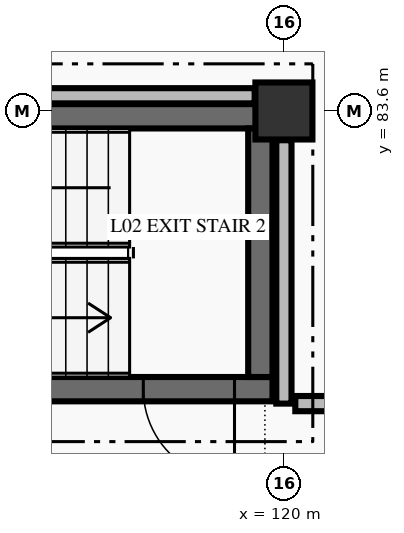
"""IFC4 building model, lengths in metres.
Left out: names, types, materials, properties, quantities, classifications, styles, units other than length and angle.
Written with IfcOpenShell. Run it as: python <this file> out.ifc"""

import sys

from ifc_helpers import new_model, si_unit, direction, frame, frame_2d, origin, origin_2d, place, context, subcontext, project, spatial, rectangle, extrude, element, fill, save


model = new_model("IFC4")
c1 = context("Model", 3, precision=1e-05, world=origin(), true_north=direction((0.0, 1.0)))
c2 = subcontext(c1, "Body", "Model", "MODEL_VIEW")
j1 = project(units=[si_unit("LENGTHUNIT", "METRE"), si_unit("PLANEANGLEUNIT", "RADIAN")], contexts=[c1])
p1 = place(None, origin())
s1 = spatial("IfcSite", under=j1, at=p1, CompositionType="ELEMENT")
p2 = place(p1, origin())
s2 = spatial("IfcBuilding", under=s1, at=p2, CompositionType="ELEMENT")
p3 = place(p2, frame((0.0, 0.0, 5.4)))
s3 = spatial("IfcBuildingStorey", under=s2, at=p3, CompositionType="ELEMENT", Elevation=5.4)
p4 = place(p3, frame((120.0, 83.6, 0.0), z_axis=(0.0, 0.0, 1.0), x_axis=(1.0, 0.0, 0.0)))
e1 = element("IfcColumn", 1, at=p4, inside=s3, PredefinedType="COLUMN", context=c2, shape_type="SweptSolid", body=[
    extrude(rectangle(XDim=0.75, YDim=0.75, at=origin_2d()), origin(), (0.0, 0.0, 1.0), 4.8),
])
p5 = place(p3, frame((119.85, 79.94, 0.0), z_axis=(0.0, 0.0, 1.0), x_axis=(-1.0, 0.0, 0.0)))
e2 = element("IfcWall", 2, at=p5, inside=s3, PredefinedType="SHEAR", context=c2, shape_type="SweptSolid", body=[
    extrude(rectangle(XDim=7.7, YDim=0.32, at=frame_2d((3.85, 0.0))), origin(), (0.0, 0.0, 1.0), 4.8),
])
p6 = place(p5, frame((0.5, 0.0, 0.0)))
e3 = element("IfcOpeningElement", 3, at=p6, cuts=e2, PredefinedType="OPENING", context=c2, shape_type="SweptSolid", body=[
    extrude(rectangle(XDim=1.2, YDim=2.2, at=frame_2d((0.6, 1.1))), frame((0.0, 0.17, 0.0), z_axis=(0.0, -1.0, 0.0), x_axis=(1.0, 0.0, 0.0)), (0.0, 0.0, 1.0), 0.34),
])
p7 = place(p3, frame((112.15, 83.53, 0.0), z_axis=(0.0, 0.0, 1.0), x_axis=(1.0, 0.0, 0.0)))
e4 = element("IfcWall", 4, at=p7, inside=s3, PredefinedType="SHEAR", context=c2, shape_type="SweptSolid", body=[
    extrude(rectangle(XDim=7.7, YDim=0.32, at=frame_2d((3.85, 0.0))), origin(), (0.0, 0.0, 1.0), 4.8),
])
p8 = place(p3, frame((119.69, 83.37, 0.0), z_axis=(0.0, 0.0, 1.0), x_axis=(0.0, -1.0, 0.0)))
e5 = element("IfcWall", 5, at=p8, inside=s3, PredefinedType="SHEAR", context=c2, shape_type="SweptSolid", body=[
    extrude(rectangle(XDim=3.27, YDim=0.32, at=frame_2d((1.635, 0.0))), origin(), (0.0, 0.0, 1.0), 4.8),
])
p9 = place(p3, frame((112.385, 83.8, 0.0), z_axis=(0.0, 0.0, 1.0), x_axis=(1.0, 0.0, 0.0)))
e6 = element("IfcWall", 6, at=p9, inside=s3, PredefinedType="STANDARD", context=c2, shape_type="SweptSolid", body=[
    extrude(rectangle(XDim=7.23, YDim=0.2, at=frame_2d((3.615, 0.0))), origin(), (0.0, 0.0, 1.0), 3.89),
])
p10 = place(p3, frame((120.0, 83.215, 0.0), z_axis=(0.0, 0.0, 1.0), x_axis=(0.0, -1.0, 0.0)))
e7 = element("IfcWall", 7, at=p10, inside=s3, PredefinedType="STANDARD", context=c2, shape_type="SweptSolid", body=[
    extrude(rectangle(XDim=3.465, YDim=0.2, at=frame_2d((1.732, 0.0))), origin(), (0.0, 0.0, 1.0), 3.84),
])
p11 = place(p3, frame((152.0, 79.75, 0.0), z_axis=(0.0, 0.0, 1.0), x_axis=(-1.0, 0.0, 0.0)))
e8 = element("IfcWall", 8, at=p11, inside=s3, PredefinedType="STANDARD", context=c2, shape_type="SweptSolid", body=[
    extrude(rectangle(XDim=31.85, YDim=0.2, at=frame_2d((15.925, 0.0))), origin(), (0.0, 0.0, 1.0), 4.54),
])
p12 = place(p11, frame((15.4, 0.0, 0.0)))
e9 = element("IfcOpeningElement", 9, at=p12, cuts=e8, PredefinedType="OPENING", context=c2, shape_type="SweptSolid", body=[
    extrude(rectangle(XDim=1.05, YDim=2.15, at=frame_2d((0.525, 1.075))), frame((0.0, 0.11, 0.0), z_axis=(0.0, -1.0, 0.0), x_axis=(1.0, 0.0, 0.0)), (0.0, 0.0, 1.0), 0.22),
])
p13 = place(p11, frame((16.9, 0.0, 0.0)))
e10 = element("IfcOpeningElement", 10, at=p13, cuts=e8, PredefinedType="OPENING", context=c2, shape_type="SweptSolid", body=[
    extrude(rectangle(XDim=1.05, YDim=2.15, at=frame_2d((0.525, 1.075))), frame((0.0, 0.11, 0.0), z_axis=(0.0, -1.0, 0.0), x_axis=(1.0, 0.0, 0.0)), (0.0, 0.0, 1.0), 0.22),
])
p14 = place(p6, origin())
e11 = element("IfcDoor", 11, at=p14, inside=s3, OperationType="SINGLE_SWING_LEFT", PredefinedType="DOOR", context=c2, shape_type="SweptSolid", body=[
    extrude(rectangle(XDim=1.2, YDim=2.2, at=frame_2d((0.6, 1.1))), frame((0.0, 0.025, 0.0), z_axis=(0.0, -1.0, 0.0), x_axis=(1.0, 0.0, 0.0)), (0.0, 0.0, 1.0), 0.05),
])
fill(e3, e11)
save(model, sys.argv[1])
